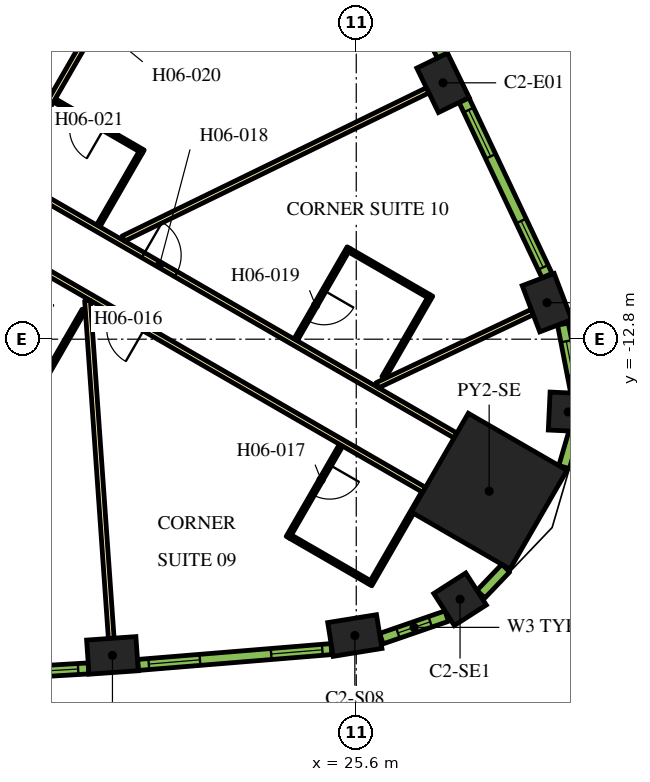
"""IFC4 building model, lengths in metres.
Left out: names, types, materials, properties, quantities, classifications, styles, units other than length and angle.
Written with IfcOpenShell. Run it as: python <this file> out.ifc"""

import sys

from ifc_helpers import new_model, si_unit, direction, frame, frame_2d, origin, origin_2d, place, context, subcontext, project, spatial, rectangle, extrude, element, fill, save


model = new_model("IFC4")
c1 = context("Model", 3, precision=1e-05, world=origin(), true_north=direction((0.0, 1.0)))
c2 = subcontext(c1, "Body", "Model", "MODEL_VIEW")
j1 = project(units=[si_unit("LENGTHUNIT", "METRE"), si_unit("PLANEANGLEUNIT", "RADIAN")], contexts=[c1])
p1 = place(None, origin())
s1 = spatial("IfcSite", under=j1, at=p1, CompositionType="ELEMENT")
p2 = place(p1, origin())
s2 = spatial("IfcBuilding", under=s1, at=p2, CompositionType="ELEMENT")
p3 = place(p2, frame((0.0, 0.0, 83.7)))
s3 = spatial("IfcBuildingStorey", under=s2, at=p3, CompositionType="ELEMENT", Elevation=83.7)
p4 = place(p3, frame((29.097, -16.799, 0.0), z_axis=(0.0, 0.0, 1.0), x_axis=(0.866025403784, -0.5, 0.0)))
e1 = element("IfcColumn", 1, at=p4, inside=s3, PredefinedType="COLUMN", context=c2, shape_type="SweptSolid", body=[
    extrude(rectangle(XDim=3.0, YDim=3.0, at=origin_2d()), origin(), (0.0, 0.0, 1.0), 3.9),
])
for number, where, z_axis, x_axis in (
    (2, (19.184, -21.12, 0.0), (0.0, 0.0, 1.0), (0.998, 0.07, 0.0)),
    (3, (25.563, -20.597, 0.0), (0.0, 0.0, 1.0), (0.987, 0.159, 0.0)),
):
    element("IfcColumn", number, at=place(p3, frame(where, z_axis=z_axis, x_axis=x_axis)), inside=s3, PredefinedType="COLUMN", context=c2, shape_type="SweptSolid", body=[
        extrude(rectangle(XDim=1.3, YDim=0.9, at=origin_2d()), origin(), (0.0, 0.0, 1.0), 3.9),
    ])
for number, where, z_axis, x_axis in (
    (4, (28.331, -19.643, 0.0), (0.0, 0.0, 1.0), (0.842, 0.54, 0.0)),
    (5, (31.177, -14.714, 0.0), (0.0, 0.0, 1.0), (0.047, 0.999, 0.0)),
):
    element("IfcColumn", number, at=place(p3, frame(where, z_axis=z_axis, x_axis=x_axis)), inside=s3, PredefinedType="COLUMN", context=c2, shape_type="SweptSolid", body=[
        extrude(rectangle(XDim=1.0, YDim=1.0, at=origin_2d()), origin(), (0.0, 0.0, 1.0), 3.9),
    ])
for number, where, z_axis, x_axis in (
    (6, (30.619, -11.839, 0.0), (0.0, 0.0, 1.0), (-0.355, 0.935, 0.0)),
    (7, (27.883, -6.054, 0.0), (0.0, 0.0, 1.0), (-0.438, 0.899, 0.0)),
):
    element("IfcColumn", number, at=place(p3, frame(where, z_axis=z_axis, x_axis=x_axis)), inside=s3, PredefinedType="COLUMN", context=c2, shape_type="SweptSolid", body=[
        extrude(rectangle(XDim=1.3, YDim=0.9, at=origin_2d()), origin(), (0.0, 0.0, 1.0), 3.9),
    ])
p5 = place(p3, frame((16.412, -8.523, 0.0), z_axis=(0.0, 0.0, 1.0), x_axis=(0.866025629663, -0.499999608766, 0.0)))
e8 = element("IfcWall", 8, at=p5, inside=s3, PredefinedType="PARTITIONING", context=c2, shape_type="SweptSolid", body=[
    extrude(rectangle(XDim=13.624, YDim=0.15, at=frame_2d((6.812, 0.0))), origin(), (0.0, 0.0, 1.0), 2.75),
])
p6 = place(p5, frame((4.134, 0.0, 0.0)))
e9 = element("IfcOpeningElement", 9, at=p6, cuts=e8, PredefinedType="OPENING", context=c2, shape_type="SweptSolid", body=[
    extrude(rectangle(XDim=1.0, YDim=2.1, at=frame_2d((0.5, 1.05))), frame((0.0, 0.085, 0.0), z_axis=(0.0, -1.0, 0.0), x_axis=(1.0, 0.0, 0.0)), (0.0, 0.0, 1.0), 0.17),
])
p7 = place(p3, frame((19.081, -3.9, 0.0), z_axis=(0.0, 0.0, 1.0), x_axis=(-0.499974327079, -0.866040225545, 0.0)))
e10 = element("IfcWall", 10, at=p7, inside=s3, PredefinedType="PARTITIONING", context=c2, shape_type="SweptSolid", body=[
    extrude(rectangle(XDim=5.258, YDim=0.15, at=frame_2d((2.629, 0.0))), origin(), (0.0, 0.0, 1.0), 2.75),
])
p8 = place(p7, frame((0.18, 0.0, 0.0)))
e11 = element("IfcOpeningElement", 11, at=p8, cuts=e10, PredefinedType="OPENING", context=c2, shape_type="SweptSolid", body=[
    extrude(rectangle(XDim=1.0, YDim=2.1, at=frame_2d((0.5, 1.05))), frame((0.0, 0.085, 0.0), z_axis=(0.0, -1.0, 0.0), x_axis=(1.0, 0.0, 0.0)), (0.0, 0.0, 1.0), 0.17),
])
p9 = place(p3, frame((27.386, -16.764, 0.0), z_axis=(0.0, 0.0, 1.0), x_axis=(-0.866022585856, 0.500004880763, 0.0)))
e12 = element("IfcWall", 12, at=p9, inside=s3, PredefinedType="PARTITIONING", context=c2, shape_type="SweptSolid", body=[
    extrude(rectangle(XDim=13.544, YDim=0.15, at=frame_2d((6.772, 0.0))), origin(), (0.0, 0.0, 1.0), 2.75),
])
p10 = place(p9, frame((12.214, 0.0, 0.0)))
e13 = element("IfcOpeningElement", 13, at=p10, cuts=e12, PredefinedType="OPENING", context=c2, shape_type="SweptSolid", body=[
    extrude(rectangle(XDim=1.0, YDim=2.1, at=frame_2d((0.5, 1.05))), frame((0.0, 0.085, 0.0), z_axis=(0.0, -1.0, 0.0), x_axis=(1.0, 0.0, 0.0)), (0.0, 0.0, 1.0), 0.17),
])
p11 = place(p9, frame((8.49, 0.0, 0.0)))
e14 = element("IfcOpeningElement", 14, at=p11, cuts=e12, PredefinedType="OPENING", context=c2, shape_type="SweptSolid", body=[
    extrude(rectangle(XDim=1.0, YDim=2.1, at=frame_2d((0.5, 1.05))), frame((0.0, 0.085, 0.0), z_axis=(0.0, -1.0, 0.0), x_axis=(1.0, 0.0, 0.0)), (0.0, 0.0, 1.0), 0.17),
])
p12 = place(p3, frame((19.153, -20.671, 0.0), z_axis=(0.0, 0.0, 1.0), x_axis=(-0.070070736723, 0.997542025107, 0.0)))
e15 = element("IfcWall", 15, at=p12, inside=s3, PredefinedType="PARTITIONING", context=c2, shape_type="SweptSolid", body=[
    extrude(rectangle(XDim=8.909, YDim=0.15, at=frame_2d((4.455, 0.0))), origin(), (0.0, 0.0, 1.0), 2.75),
])
p13 = place(p3, frame((27.479, -6.251, 0.0), z_axis=(0.0, 0.0, 1.0), x_axis=(-0.898945877276, -0.438059710231, 0.0)))
e16 = element("IfcWall", 16, at=p13, inside=s3, PredefinedType="PARTITIONING", context=c2, shape_type="SweptSolid", body=[
    extrude(rectangle(XDim=8.909, YDim=0.15, at=frame_2d((4.455, 0.0))), origin(), (0.0, 0.0, 1.0), 2.75),
])
p14 = place(p3, frame((30.231, -12.085, 0.0), z_axis=(0.0, 0.0, 1.0), x_axis=(-0.904001132572, -0.427530060122, 0.0)))
e17 = element("IfcWall", 17, at=p14, inside=s3, PredefinedType="PARTITIONING", context=c2, shape_type="SweptSolid", body=[
    extrude(rectangle(XDim=4.51, YDim=0.15, at=frame_2d((2.255, 0.0))), origin(), (0.0, 0.0, 1.0), 2.75),
])
p15 = place(p3, frame((18.429, -12.037, 0.0), z_axis=(0.0, 0.0, 1.0), x_axis=(-0.500007957085, -0.86602080971, 0.0)))
e18 = element("IfcWall", 18, at=p15, inside=s3, PredefinedType="PARTITIONING", context=c2, shape_type="SweptSolid", body=[
    extrude(rectangle(XDim=2.64, YDim=0.1, at=frame_2d((1.32, 0.0))), origin(), (0.0, 0.0, 1.0), 2.75),
])
p16 = place(p3, frame((25.2, -15.589, 0.0), z_axis=(0.0, 0.0, 1.0), x_axis=(-0.500011755427, -0.866018616679, 0.0)))
e19 = element("IfcWall", 19, at=p16, inside=s3, PredefinedType="PARTITIONING", context=c2, shape_type="SweptSolid", body=[
    extrude(rectangle(XDim=2.8, YDim=0.1, at=frame_2d((1.4, 0.0))), origin(), (0.0, 0.0, 1.0), 2.75),
])
p17 = place(p16, frame((0.6, 0.0, 0.0)))
e20 = element("IfcOpeningElement", 20, at=p17, cuts=e19, PredefinedType="OPENING", context=c2, shape_type="SweptSolid", body=[
    extrude(rectangle(XDim=0.9, YDim=2.1, at=frame_2d((0.45, 1.05))), frame((0.0, 0.06, 0.0), z_axis=(0.0, -1.0, 0.0), x_axis=(1.0, 0.0, 0.0)), (0.0, 0.0, 1.0), 0.12),
])
p18 = place(p3, frame((23.869, -17.995, 0.0), z_axis=(0.0, 0.0, 1.0), x_axis=(0.866050077142, -0.499957262057, 0.0)))
e21 = element("IfcWall", 21, at=p18, inside=s3, PredefinedType="PARTITIONING", context=c2, shape_type="SweptSolid", body=[
    extrude(rectangle(XDim=2.4, YDim=0.1, at=frame_2d((1.2, 0.0))), origin(), (0.0, 0.0, 1.0), 2.75),
])
p19 = place(p3, frame((27.365, -16.839, 0.0), z_axis=(0.0, 0.0, 1.0), x_axis=(-0.49994636267, -0.866056369097, 0.0)))
e22 = element("IfcWall", 22, at=p19, inside=s3, PredefinedType="PARTITIONING", context=c2, shape_type="SweptSolid", body=[
    extrude(rectangle(XDim=2.8, YDim=0.1, at=frame_2d((1.4, 0.0))), origin(), (0.0, 0.0, 1.0), 2.75),
])
p20 = place(p3, frame((25.404, -10.395, 0.0), z_axis=(0.0, 0.0, 1.0), x_axis=(-0.500011755427, -0.866018616679, 0.0)))
e23 = element("IfcWall", 23, at=p20, inside=s3, PredefinedType="PARTITIONING", context=c2, shape_type="SweptSolid", body=[
    extrude(rectangle(XDim=2.8, YDim=0.1, at=frame_2d((1.4, 0.0))), origin(), (0.0, 0.0, 1.0), 2.75),
])
p21 = place(p20, frame((1.3, 0.0, 0.0)))
e24 = element("IfcOpeningElement", 24, at=p21, cuts=e23, PredefinedType="OPENING", context=c2, shape_type="SweptSolid", body=[
    extrude(rectangle(XDim=0.9, YDim=2.1, at=frame_2d((0.45, 1.05))), frame((0.0, 0.06, 0.0), z_axis=(0.0, -1.0, 0.0), x_axis=(1.0, 0.0, 0.0)), (0.0, 0.0, 1.0), 0.12),
])
p22 = place(p3, frame((25.422, -10.463, 0.0), z_axis=(0.0, 0.0, 1.0), x_axis=(0.866024647952, -0.500001309137, 0.0)))
e25 = element("IfcWall", 25, at=p22, inside=s3, PredefinedType="PARTITIONING", context=c2, shape_type="SweptSolid", body=[
    extrude(rectangle(XDim=2.4, YDim=0.1, at=frame_2d((1.2, 0.0))), origin(), (0.0, 0.0, 1.0), 2.75),
])
p23 = place(p3, frame((26.319, -13.81, 0.0), z_axis=(0.0, 0.0, 1.0), x_axis=(0.499961950354, 0.866047370643, 0.0)))
e26 = element("IfcWall", 26, at=p23, inside=s3, PredefinedType="PARTITIONING", context=c2, shape_type="SweptSolid", body=[
    extrude(rectangle(XDim=2.5, YDim=0.1, at=frame_2d((1.25, 0.0))), origin(), (0.0, 0.0, 1.0), 2.75),
])
p24 = place(p3, frame((19.996, -7.867, 0.0), z_axis=(0.0, 0.0, 1.0), x_axis=(-0.866019956843, 0.50000943426, 0.0)))
e27 = element("IfcWall", 27, at=p24, inside=s3, PredefinedType="PARTITIONING", context=c2, shape_type="SweptSolid", body=[
    extrude(rectangle(XDim=2.7, YDim=0.1, at=frame_2d((1.35, 0.0))), origin(), (0.0, 0.0, 1.0), 2.75),
])
p25 = place(p24, frame((1.2, 0.0, 0.0)))
e28 = element("IfcOpeningElement", 28, at=p25, cuts=e27, PredefinedType="OPENING", context=c2, shape_type="SweptSolid", body=[
    extrude(rectangle(XDim=0.9, YDim=2.1, at=frame_2d((0.45, 1.05))), frame((0.0, 0.06, 0.0), z_axis=(0.0, -1.0, 0.0), x_axis=(1.0, 0.0, 0.0)), (0.0, 0.0, 1.0), 0.12),
])
p26 = place(p3, frame((19.922, -7.894, 0.0), z_axis=(0.0, 0.0, 1.0), x_axis=(-0.499995378973, -0.866028071719, 0.0)))
e29 = element("IfcWall", 29, at=p26, inside=s3, PredefinedType="PARTITIONING", context=c2, shape_type="SweptSolid", body=[
    extrude(rectangle(XDim=2.22, YDim=0.1, at=frame_2d((1.11, 0.0))), origin(), (0.0, 0.0, 1.0), 2.75),
])
p27 = place(p3, frame((13.462, -21.761, 0.0), z_axis=(0.0, 0.0, 1.0), x_axis=(0.998290511436, 0.058447025388, 0.0)))
e30 = element("IfcWall", 30, at=p27, inside=s3, PredefinedType="SOLIDWALL", context=c2, shape_type="SweptSolid", body=[
    extrude(rectangle(XDim=5.1, YDim=0.29, at=frame_2d((2.55, 0.0))), origin(), (0.0, 0.0, 1.0), 3.65),
])
p28 = place(p27, frame((0.272, 0.0, 0.9)))
e31 = element("IfcOpeningElement", 31, at=p28, cuts=e30, PredefinedType="OPENING", context=c2, shape_type="SweptSolid", body=[
    extrude(rectangle(XDim=1.35, YDim=2.15, at=frame_2d((0.675, 1.075))), frame((0.0, 0.155, 0.0), z_axis=(0.0, -1.0, 0.0), x_axis=(1.0, 0.0, 0.0)), (0.0, 0.0, 1.0), 0.31),
])
p29 = place(p27, frame((3.478, 0.0, 0.9)))
e32 = element("IfcOpeningElement", 32, at=p29, cuts=e30, PredefinedType="OPENING", context=c2, shape_type="SweptSolid", body=[
    extrude(rectangle(XDim=1.35, YDim=2.15, at=frame_2d((0.675, 1.075))), frame((0.0, 0.155, 0.0), z_axis=(0.0, -1.0, 0.0), x_axis=(1.0, 0.0, 0.0)), (0.0, 0.0, 1.0), 0.31),
])
p30 = place(p3, frame((19.857, -21.371, 0.0), z_axis=(0.0, 0.0, 1.0), x_axis=(0.99665273362, 0.081751627308, 0.0)))
e33 = element("IfcWall", 33, at=p30, inside=s3, PredefinedType="SOLIDWALL", context=c2, shape_type="SweptSolid", body=[
    extrude(rectangle(XDim=5.107, YDim=0.29, at=frame_2d((2.553, 0.0))), origin(), (0.0, 0.0, 1.0), 3.65),
])
p31 = place(p30, frame((0.285, 0.0, 0.9)))
e34 = element("IfcOpeningElement", 34, at=p31, cuts=e33, PredefinedType="OPENING", context=c2, shape_type="SweptSolid", body=[
    extrude(rectangle(XDim=1.35, YDim=2.15, at=frame_2d((0.675, 1.075))), frame((0.0, 0.155, 0.0), z_axis=(0.0, -1.0, 0.0), x_axis=(1.0, 0.0, 0.0)), (0.0, 0.0, 1.0), 0.31),
])
p32 = place(p30, frame((3.516, 0.0, 0.9)))
e35 = element("IfcOpeningElement", 35, at=p32, cuts=e33, PredefinedType="OPENING", context=c2, shape_type="SweptSolid", body=[
    extrude(rectangle(XDim=1.35, YDim=2.15, at=frame_2d((0.675, 1.075))), frame((0.0, 0.155, 0.0), z_axis=(0.0, -1.0, 0.0), x_axis=(1.0, 0.0, 0.0)), (0.0, 0.0, 1.0), 0.31),
])
p33 = place(p3, frame((26.261, -20.679, 0.0), z_axis=(0.0, 0.0, 1.0), x_axis=(0.945385815453, 0.325953462844, 0.0)))
e36 = element("IfcWall", 36, at=p33, inside=s3, PredefinedType="SOLIDWALL", context=c2, shape_type="SweptSolid", body=[
    extrude(rectangle(XDim=1.819, YDim=0.29, at=frame_2d((0.91, 0.0))), origin(), (0.0, 0.0, 1.0), 3.65),
])
p34 = place(p33, frame((0.46, 0.0, 0.9)))
e37 = element("IfcOpeningElement", 37, at=p34, cuts=e36, PredefinedType="OPENING", context=c2, shape_type="SweptSolid", body=[
    extrude(rectangle(XDim=0.9, YDim=2.15, at=frame_2d((0.45, 1.075))), frame((0.0, 0.155, 0.0), z_axis=(0.0, -1.0, 0.0), x_axis=(1.0, 0.0, 0.0)), (0.0, 0.0, 1.0), 0.31),
])
p35 = place(p3, frame((28.88, -19.509, 0.0), z_axis=(0.0, 0.0, 1.0), x_axis=(0.690414427296, 0.723414071319, 0.0)))
e38 = element("IfcWall", 38, at=p35, inside=s3, PredefinedType="SOLIDWALL", context=c2, shape_type="SweptSolid", body=[
    extrude(rectangle(XDim=0.947, YDim=0.29, at=frame_2d((0.474, 0.0))), origin(), (0.0, 0.0, 1.0), 3.65),
])
p36 = place(p3, frame((31.069, -16.165, 0.0), z_axis=(0.0, 0.0, 1.0), x_axis=(0.281454582132, 0.95957455062, 0.0)))
e39 = element("IfcWall", 39, at=p36, inside=s3, PredefinedType="SOLIDWALL", context=c2, shape_type="SweptSolid", body=[
    extrude(rectangle(XDim=0.947, YDim=0.29, at=frame_2d((0.474, 0.0))), origin(), (0.0, 0.0, 1.0), 3.65),
])
p37 = place(p3, frame((31.385, -14.189, 0.0), z_axis=(0.0, 0.0, 1.0), x_axis=(-0.190409913989, 0.981704672829, 0.0)))
e40 = element("IfcWall", 40, at=p37, inside=s3, PredefinedType="SOLIDWALL", context=c2, shape_type="SweptSolid", body=[
    extrude(rectangle(XDim=1.819, YDim=0.29, at=frame_2d((0.91, 0.0))), origin(), (0.0, 0.0, 1.0), 3.65),
])
p38 = place(p37, frame((0.46, 0.0, 0.9)))
e41 = element("IfcOpeningElement", 41, at=p38, cuts=e40, PredefinedType="OPENING", context=c2, shape_type="SweptSolid", body=[
    extrude(rectangle(XDim=0.9, YDim=2.15, at=frame_2d((0.45, 1.075))), frame((0.0, 0.155, 0.0), z_axis=(0.0, -1.0, 0.0), x_axis=(1.0, 0.0, 0.0)), (0.0, 0.0, 1.0), 0.31),
])
p39 = place(p3, frame((30.62, -11.127, 0.0), z_axis=(0.0, 0.0, 1.0), x_axis=(-0.427543726596, 0.903994669148, 0.0)))
e42 = element("IfcWall", 42, at=p39, inside=s3, PredefinedType="SOLIDWALL", context=c2, shape_type="SweptSolid", body=[
    extrude(rectangle(XDim=5.107, YDim=0.29, at=frame_2d((2.553, 0.0))), origin(), (0.0, 0.0, 1.0), 3.65),
])
p40 = place(p39, frame((0.24, 0.0, 0.9)))
e43 = element("IfcOpeningElement", 43, at=p40, cuts=e42, PredefinedType="OPENING", context=c2, shape_type="SweptSolid", body=[
    extrude(rectangle(XDim=1.35, YDim=2.15, at=frame_2d((0.675, 1.075))), frame((0.0, 0.155, 0.0), z_axis=(0.0, -1.0, 0.0), x_axis=(1.0, 0.0, 0.0)), (0.0, 0.0, 1.0), 0.31),
])
p41 = place(p39, frame((3.471, 0.0, 0.9)))
e44 = element("IfcOpeningElement", 44, at=p41, cuts=e42, PredefinedType="OPENING", context=c2, shape_type="SweptSolid", body=[
    extrude(rectangle(XDim=1.35, YDim=2.15, at=frame_2d((0.675, 1.075))), frame((0.0, 0.155, 0.0), z_axis=(0.0, -1.0, 0.0), x_axis=(1.0, 0.0, 0.0)), (0.0, 0.0, 1.0), 0.31),
])
p42 = place(p3, frame((27.864, -5.336, 0.0), z_axis=(0.0, 0.0, 1.0), x_axis=(-0.448534297211, 0.893765620409, 0.0)))
e45 = element("IfcWall", 45, at=p42, inside=s3, PredefinedType="SOLIDWALL", context=c2, shape_type="SweptSolid", body=[
    extrude(rectangle(XDim=5.1, YDim=0.29, at=frame_2d((2.55, 0.0))), origin(), (0.0, 0.0, 1.0), 3.65),
])
p43 = place(p42, frame((0.272, 0.0, 0.9)))
e46 = element("IfcOpeningElement", 46, at=p43, cuts=e45, PredefinedType="OPENING", context=c2, shape_type="SweptSolid", body=[
    extrude(rectangle(XDim=1.35, YDim=2.15, at=frame_2d((0.675, 1.075))), frame((0.0, 0.155, 0.0), z_axis=(0.0, -1.0, 0.0), x_axis=(1.0, 0.0, 0.0)), (0.0, 0.0, 1.0), 0.31),
])
p44 = place(p42, frame((3.478, 0.0, 0.9)))
e47 = element("IfcOpeningElement", 47, at=p44, cuts=e45, PredefinedType="OPENING", context=c2, shape_type="SweptSolid", body=[
    extrude(rectangle(XDim=1.35, YDim=2.15, at=frame_2d((0.675, 1.075))), frame((0.0, 0.155, 0.0), z_axis=(0.0, -1.0, 0.0), x_axis=(1.0, 0.0, 0.0)), (0.0, 0.0, 1.0), 0.31),
])
p45 = place(p11, origin())
e48 = element("IfcDoor", 48, at=p45, inside=s3, OperationType="SINGLE_SWING_RIGHT", PredefinedType="DOOR", context=c2, shape_type="SweptSolid", body=[
    extrude(rectangle(XDim=1.0, YDim=2.1, at=frame_2d((0.5, 1.05))), frame((0.0, 0.025, 0.0), z_axis=(0.0, -1.0, 0.0), x_axis=(1.0, 0.0, 0.0)), (0.0, 0.0, 1.0), 0.05),
])
fill(e14, e48)
p46 = place(p17, origin())
e49 = element("IfcDoor", 49, at=p46, inside=s3, OperationType="SINGLE_SWING_RIGHT", PredefinedType="DOOR", context=c2, shape_type="SweptSolid", body=[
    extrude(rectangle(XDim=0.9, YDim=2.1, at=frame_2d((0.45, 1.05))), frame((0.0, 0.025, 0.0), z_axis=(0.0, -1.0, 0.0), x_axis=(1.0, 0.0, 0.0)), (0.0, 0.0, 1.0), 0.05),
])
fill(e20, e49)
p47 = place(p6, origin())
e50 = element("IfcDoor", 50, at=p47, inside=s3, OperationType="SINGLE_SWING_LEFT", PredefinedType="DOOR", context=c2, shape_type="SweptSolid", body=[
    extrude(rectangle(XDim=1.0, YDim=2.1, at=frame_2d((0.5, 1.05))), frame((0.0, 0.025, 0.0), z_axis=(0.0, -1.0, 0.0), x_axis=(1.0, 0.0, 0.0)), (0.0, 0.0, 1.0), 0.05),
])
fill(e9, e50)
p48 = place(p21, origin())
e51 = element("IfcDoor", 51, at=p48, inside=s3, OperationType="SINGLE_SWING_LEFT", PredefinedType="DOOR", context=c2, shape_type="SweptSolid", body=[
    extrude(rectangle(XDim=0.9, YDim=2.1, at=frame_2d((0.45, 1.05))), frame((0.0, 0.025, 0.0), z_axis=(0.0, -1.0, 0.0), x_axis=(1.0, 0.0, 0.0)), (0.0, 0.0, 1.0), 0.05),
])
fill(e24, e51)
p49 = place(p25, origin())
e52 = element("IfcDoor", 52, at=p49, inside=s3, OperationType="SINGLE_SWING_LEFT", PredefinedType="DOOR", context=c2, shape_type="SweptSolid", body=[
    extrude(rectangle(XDim=0.9, YDim=2.1, at=frame_2d((0.45, 1.05))), frame((0.0, 0.025, 0.0), z_axis=(0.0, -1.0, 0.0), x_axis=(1.0, 0.0, 0.0)), (0.0, 0.0, 1.0), 0.05),
])
fill(e28, e52)
p50 = place(p29, origin())
e53 = element("IfcWindow", 53, at=p50, inside=s3, PartitioningType="DOUBLE_PANEL_VERTICAL", PredefinedType="WINDOW", context=c2, shape_type="SweptSolid", body=[
    extrude(rectangle(XDim=1.35, YDim=2.15, at=frame_2d((0.675, 1.075))), frame((0.0, 0.015, 0.0), z_axis=(0.0, -1.0, 0.0), x_axis=(1.0, 0.0, 0.0)), (0.0, 0.0, 1.0), 0.06),
])
fill(e32, e53)
p51 = place(p31, origin())
e54 = element("IfcWindow", 54, at=p51, inside=s3, PartitioningType="DOUBLE_PANEL_VERTICAL", PredefinedType="WINDOW", context=c2, shape_type="SweptSolid", body=[
    extrude(rectangle(XDim=1.35, YDim=2.15, at=frame_2d((0.675, 1.075))), frame((0.0, 0.015, 0.0), z_axis=(0.0, -1.0, 0.0), x_axis=(1.0, 0.0, 0.0)), (0.0, 0.0, 1.0), 0.06),
])
fill(e34, e54)
p52 = place(p32, origin())
e55 = element("IfcWindow", 55, at=p52, inside=s3, PartitioningType="DOUBLE_PANEL_VERTICAL", PredefinedType="WINDOW", context=c2, shape_type="SweptSolid", body=[
    extrude(rectangle(XDim=1.35, YDim=2.15, at=frame_2d((0.675, 1.075))), frame((0.0, 0.015, 0.0), z_axis=(0.0, -1.0, 0.0), x_axis=(1.0, 0.0, 0.0)), (0.0, 0.0, 1.0), 0.06),
])
fill(e35, e55)
p53 = place(p34, origin())
e56 = element("IfcWindow", 56, at=p53, inside=s3, PartitioningType="SINGLE_PANEL", PredefinedType="WINDOW", context=c2, shape_type="SweptSolid", body=[
    extrude(rectangle(XDim=0.9, YDim=2.15, at=frame_2d((0.45, 1.075))), frame((0.0, 0.015, 0.0), z_axis=(0.0, -1.0, 0.0), x_axis=(1.0, 0.0, 0.0)), (0.0, 0.0, 1.0), 0.06),
])
fill(e37, e56)
p54 = place(p38, origin())
e57 = element("IfcWindow", 57, at=p54, inside=s3, PartitioningType="SINGLE_PANEL", PredefinedType="WINDOW", context=c2, shape_type="SweptSolid", body=[
    extrude(rectangle(XDim=0.9, YDim=2.15, at=frame_2d((0.45, 1.075))), frame((0.0, 0.015, 0.0), z_axis=(0.0, -1.0, 0.0), x_axis=(1.0, 0.0, 0.0)), (0.0, 0.0, 1.0), 0.06),
])
fill(e41, e57)
p55 = place(p40, origin())
e58 = element("IfcWindow", 58, at=p55, inside=s3, PartitioningType="DOUBLE_PANEL_VERTICAL", PredefinedType="WINDOW", context=c2, shape_type="SweptSolid", body=[
    extrude(rectangle(XDim=1.35, YDim=2.15, at=frame_2d((0.675, 1.075))), frame((0.0, 0.015, 0.0), z_axis=(0.0, -1.0, 0.0), x_axis=(1.0, 0.0, 0.0)), (0.0, 0.0, 1.0), 0.06),
])
fill(e43, e58)
p56 = place(p41, origin())
e59 = element("IfcWindow", 59, at=p56, inside=s3, PartitioningType="DOUBLE_PANEL_VERTICAL", PredefinedType="WINDOW", context=c2, shape_type="SweptSolid", body=[
    extrude(rectangle(XDim=1.35, YDim=2.15, at=frame_2d((0.675, 1.075))), frame((0.0, 0.015, 0.0), z_axis=(0.0, -1.0, 0.0), x_axis=(1.0, 0.0, 0.0)), (0.0, 0.0, 1.0), 0.06),
])
fill(e44, e59)
save(model, sys.argv[1])
